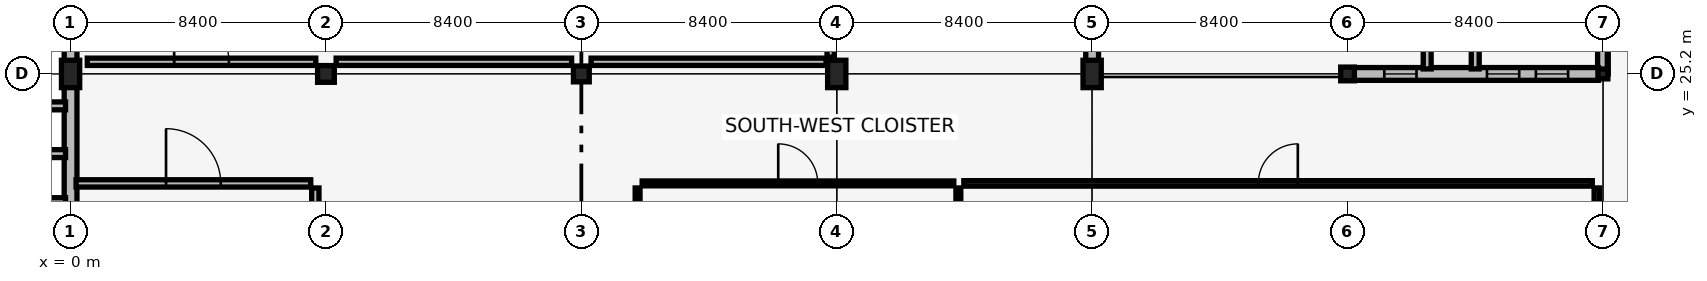
"""IFC4 building model, lengths in metres.
Left out: names, types, materials, properties, quantities, classifications, styles, units other than length and angle.
Written with IfcOpenShell. Run it as: python <this file> out.ifc"""

import sys

from ifc_helpers import new_model, si_unit, direction, frame, frame_2d, origin, origin_2d, place, context, subcontext, project, spatial, polyline, rectangle, hollow_circle, outline, extrude, element, fill, save


model = new_model("IFC4")
c1 = context("Model", 3, precision=1e-05, world=origin(), true_north=direction((0.0, 1.0)))
c2 = subcontext(c1, "Body", "Model", "MODEL_VIEW")
j1 = project(units=[si_unit("LENGTHUNIT", "METRE"), si_unit("PLANEANGLEUNIT", "RADIAN")], contexts=[c1])
p1 = place(None, origin())
s1 = spatial("IfcSite", under=j1, at=p1, CompositionType="ELEMENT")
p2 = place(p1, origin())
s2 = spatial("IfcBuilding", under=s1, at=p2, CompositionType="ELEMENT")
p3 = place(p2, origin())
s3 = spatial("IfcBuildingStorey", under=s2, at=p3, CompositionType="ELEMENT", Elevation=0.0)
p4 = place(p3, frame((0.0, 25.2, 0.0), z_axis=(0.0, 0.0, 1.0), x_axis=(1.0, 0.0, 0.0)))
e1 = element("IfcColumn", 1, at=p4, inside=s3, PredefinedType="COLUMN", context=c2, shape_type="SweptSolid", body=[
    extrude(rectangle(XDim=0.6, YDim=0.9, at=origin_2d()), origin(), (0.0, 0.0, 1.0), 5.14),
])
p5 = place(p3, frame((8.4, 25.2, 0.0), z_axis=(0.0, 0.0, 1.0), x_axis=(1.0, 0.0, 0.0)))
e2 = element("IfcColumn", 2, at=p5, inside=s3, PredefinedType="COLUMN", context=c2, shape_type="SweptSolid", body=[
    extrude(rectangle(XDim=0.55, YDim=0.55, at=origin_2d()), origin(), (0.0, 0.0, 1.0), 5.16),
])
p6 = place(p3, frame((16.8, 25.2, 0.0), z_axis=(0.0, 0.0, 1.0), x_axis=(1.0, 0.0, 0.0)))
e3 = element("IfcColumn", 3, at=p6, inside=s3, PredefinedType="COLUMN", context=c2, shape_type="SweptSolid", body=[
    extrude(rectangle(XDim=0.52, YDim=0.52, at=origin_2d()), origin(), (0.0, 0.0, 1.0), 5.16),
])
for number, where, z_axis, x_axis in (
    (4, (25.2, 25.2, 0.0), (0.0, 0.0, 1.0), (1.0, 0.0, 0.0)),
    (5, (33.6, 25.2, 0.0), (0.0, 0.0, 1.0), (1.0, 0.0, 0.0)),
):
    element("IfcColumn", number, at=place(p3, frame(where, z_axis=z_axis, x_axis=x_axis)), inside=s3, PredefinedType="COLUMN", context=c2, shape_type="SweptSolid", body=[
        extrude(rectangle(XDim=0.6, YDim=0.9, at=origin_2d()), origin(), (0.0, 0.0, 1.0), 5.14),
    ])
p7 = place(p3, frame((42.0, 25.2, -0.32), z_axis=(0.0, 0.0, 1.0), x_axis=(1.0, 0.0, 0.0)))
e6 = element("IfcColumn", 6, at=p7, inside=s3, PredefinedType="COLUMN", context=c2, shape_type="SweptSolid", body=[
    extrude(rectangle(XDim=0.45, YDim=0.45, at=origin_2d()), origin(), (0.0, 0.0, 1.0), 5.46),
])
p8 = place(p3, frame((50.4, 25.2, 0.0), z_axis=(0.0, 0.0, 1.0), x_axis=(1.0, 0.0, 0.0)))
e7 = element("IfcColumn", 7, at=p8, inside=s3, PredefinedType="COLUMN", context=c2, shape_type="SweptSolid", body=[
    extrude(hollow_circle(Radius=0.162, WallThickness=0.016, at=origin_2d()), origin(), (0.0, 0.0, 1.0), 5.14),
])
p9 = place(p3, frame((50.4, 25.2, 5.145), z_axis=(0.0, 0.0, 1.0), x_axis=(0.0, 1.0, 0.0)))
e8 = element("IfcWall", 8, at=p9, inside=s3, PredefinedType="SOLIDWALL", context=c2, shape_type="SweptSolid", body=[
    extrude(outline(polyline([(0.0, 0.0), (8.4, 0.0), (8.4, 0.25), (4.2, 2.489), (0.0, 0.25), (0.0, 0.0)])), frame((0.0, 0.175, 0.0), z_axis=(0.0, -1.0, 0.0), x_axis=(1.0, 0.0, 0.0)), (0.0, 0.0, 1.0), 0.35),
])
p10 = place(p3, frame((0.0, 17.025, 0.0), z_axis=(0.0, 0.0, 1.0), x_axis=(0.0, 1.0, 0.0)))
e9 = element("IfcWall", 9, at=p10, inside=s3, PredefinedType="SOLIDWALL", context=c2, shape_type="SweptSolid", body=[
    extrude(rectangle(XDim=7.74, YDim=0.42, at=frame_2d((3.87, 0.0))), origin(), (0.0, 0.0, 1.0), 4.39),
])
for number, where, z_axis, x_axis in (
    (10, (-0.165, 21.0, -0.25), (0.0, 0.0, 1.0), (-1.0, 0.0, 0.0)),
    (11, (-0.165, 22.58, -0.25), (0.0, 0.0, 1.0), (-1.0, 0.0, 0.0)),
    (12, (-0.165, 24.15, -0.25), (0.0, 0.0, 1.0), (-1.0, 0.0, 0.0)),
):
    element("IfcWall", number, at=place(p3, frame(where, z_axis=z_axis, x_axis=x_axis)), inside=s3, PredefinedType="SOLIDWALL", context=c2, shape_type="SweptSolid", body=[
        extrude(rectangle(XDim=0.7, YDim=0.26, at=frame_2d((0.35, 0.0))), origin(), (0.0, 0.0, 1.0), 5.69),
    ])
p11 = place(p3, frame((0.0, 25.635, 0.0), z_axis=(0.0, 0.0, 1.0), x_axis=(0.0, 1.0, 0.0)))
e13 = element("IfcWall", 13, at=p11, inside=s3, PredefinedType="SOLIDWALL", context=c2, shape_type="SweptSolid", body=[
    extrude(rectangle(XDim=7.53, YDim=0.42, at=frame_2d((3.765, 0.0))), origin(), (0.0, 0.0, 1.0), 5.04),
])
p12 = place(p3, frame((33.6, 25.635, 0.0), z_axis=(0.0, 0.0, 1.0), x_axis=(0.0, 1.0, 0.0)))
e14 = element("IfcWall", 14, at=p12, inside=s3, PredefinedType="SOLIDWALL", context=c2, shape_type="SweptSolid", body=[
    extrude(rectangle(XDim=7.53, YDim=0.42, at=frame_2d((3.765, 0.0))), origin(), (0.0, 0.0, 1.0), 4.35),
])
p13 = place(p3, frame((42.21, 25.2, 0.0), z_axis=(0.0, 0.0, 1.0), x_axis=(1.0, 0.0, 0.0)))
e15 = element("IfcWall", 15, at=p13, inside=s3, PredefinedType="SOLIDWALL", context=c2, shape_type="SweptSolid", body=[
    extrude(rectangle(XDim=8.043, YDim=0.42, at=frame_2d((4.021, 0.0))), origin(), (0.0, 0.0, 1.0), 4.39),
])
p14 = place(p13, frame((0.998, 0.0, 0.75)))
e16 = element("IfcOpeningElement", 16, at=p14, cuts=e15, PredefinedType="OPENING", context=c2, shape_type="SweptSolid", body=[
    extrude(rectangle(XDim=1.06, YDim=2.7, at=frame_2d((0.53, 1.35))), frame((0.0, 0.22, 0.0), z_axis=(0.0, -1.0, 0.0), x_axis=(1.0, 0.0, 0.0)), (0.0, 0.0, 1.0), 0.44),
])
p15 = place(p13, frame((4.376, 0.0, 0.75)))
e17 = element("IfcOpeningElement", 17, at=p15, cuts=e15, PredefinedType="OPENING", context=c2, shape_type="SweptSolid", body=[
    extrude(rectangle(XDim=1.06, YDim=2.7, at=frame_2d((0.53, 1.35))), frame((0.0, 0.22, 0.0), z_axis=(0.0, -1.0, 0.0), x_axis=(1.0, 0.0, 0.0)), (0.0, 0.0, 1.0), 0.44),
])
p16 = place(p13, frame((5.985, 0.0, 0.75)))
e18 = element("IfcOpeningElement", 18, at=p16, cuts=e15, PredefinedType="OPENING", context=c2, shape_type="SweptSolid", body=[
    extrude(rectangle(XDim=1.06, YDim=2.7, at=frame_2d((0.53, 1.35))), frame((0.0, 0.22, 0.0), z_axis=(0.0, -1.0, 0.0), x_axis=(1.0, 0.0, 0.0)), (0.0, 0.0, 1.0), 0.44),
])
for number, where, z_axis, x_axis in (
    (19, (44.62, 25.365, -0.32), (0.0, 0.0, 1.0), (0.0, 1.0, 0.0)),
    (20, (46.2, 25.365, -0.32), (0.0, 0.0, 1.0), (0.0, 1.0, 0.0)),
):
    element("IfcWall", number, at=place(p3, frame(where, z_axis=z_axis, x_axis=x_axis)), inside=s3, PredefinedType="SOLIDWALL", context=c2, shape_type="SweptSolid", body=[
        extrude(rectangle(XDim=0.7, YDim=0.26, at=frame_2d((0.35, 0.0))), origin(), (0.0, 0.0, 1.0), 5.76),
    ])
p17 = place(p3, frame((0.55, 25.6, 0.0), z_axis=(0.0, 0.0, 1.0), x_axis=(1.0, 0.0, 0.0)))
e21 = element("IfcWall", 21, at=p17, inside=s3, PredefinedType="PARTITIONING", context=c2, shape_type="SweptSolid", body=[
    extrude(rectangle(XDim=7.515, YDim=0.24, at=frame_2d((3.757, 0.0))), origin(), (0.0, 0.0, 1.0), 5.14),
])
p18 = place(p17, frame((2.857, 0.0, 0.0)))
e22 = element("IfcOpeningElement", 22, at=p18, cuts=e21, PredefinedType="OPENING", context=c2, shape_type="SweptSolid", body=[
    extrude(rectangle(XDim=1.8, YDim=2.4, at=frame_2d((0.9, 1.2))), frame((0.0, 0.13, 0.0), z_axis=(0.0, -1.0, 0.0), x_axis=(1.0, 0.0, 0.0)), (0.0, 0.0, 1.0), 0.26),
])
p19 = place(p3, frame((8.735, 25.6, 0.0), z_axis=(0.0, 0.0, 1.0), x_axis=(1.0, 0.0, 0.0)))
e23 = element("IfcWall", 23, at=p19, inside=s3, PredefinedType="PARTITIONING", context=c2, shape_type="SweptSolid", body=[
    extrude(rectangle(XDim=7.745, YDim=0.24, at=frame_2d((3.873, 0.0))), origin(), (0.0, 0.0, 1.0), 5.14),
])
p20 = place(p3, frame((17.12, 25.6, 0.0), z_axis=(0.0, 0.0, 1.0), x_axis=(1.0, 0.0, 0.0)))
e24 = element("IfcWall", 24, at=p20, inside=s3, PredefinedType="PARTITIONING", context=c2, shape_type="SweptSolid", body=[
    extrude(rectangle(XDim=7.73, YDim=0.24, at=frame_2d((3.865, 0.0))), origin(), (0.0, 0.0, 1.0), 5.14),
])
p21 = place(p3, frame((25.0, 25.75, 0.0), z_axis=(0.0, 0.0, 1.0), x_axis=(0.0, 1.0, 0.0)))
e25 = element("IfcWall", 25, at=p21, inside=s3, PredefinedType="PARTITIONING", context=c2, shape_type="SweptSolid", body=[
    extrude(rectangle(XDim=7.34, YDim=0.24, at=frame_2d((3.67, 0.0))), origin(), (0.0, 0.0, 1.0), 4.35),
])
p22 = place(p3, frame((0.18, 21.6, 0.0), z_axis=(0.0, 0.0, 1.0), x_axis=(1.0, 0.0, 0.0)))
e26 = element("IfcWall", 26, at=p22, inside=s3, PredefinedType="PARTITIONING", context=c2, shape_type="SweptSolid", body=[
    extrude(rectangle(XDim=7.72, YDim=0.24, at=frame_2d((3.86, 0.0))), origin(), (0.0, 0.0, 1.0), 4.39),
])
p23 = place(p22, frame((2.96, 0.0, 0.0)))
e27 = element("IfcOpeningElement", 27, at=p23, cuts=e26, PredefinedType="OPENING", context=c2, shape_type="SweptSolid", body=[
    extrude(rectangle(XDim=1.8, YDim=2.4, at=frame_2d((0.9, 1.2))), frame((0.0, 0.13, 0.0), z_axis=(0.0, -1.0, 0.0), x_axis=(1.0, 0.0, 0.0)), (0.0, 0.0, 1.0), 0.26),
])
p24 = place(p3, frame((8.05, 17.07, 0.0), z_axis=(0.0, 0.0, 1.0), x_axis=(0.0, 1.0, 0.0)))
e28 = element("IfcWall", 28, at=p24, inside=s3, PredefinedType="PARTITIONING", context=c2, shape_type="SweptSolid", body=[
    extrude(rectangle(XDim=4.38, YDim=0.24, at=frame_2d((2.19, 0.0))), origin(), (0.0, 0.0, 1.0), 4.36),
])
p25 = place(p3, frame((18.8, 21.6, 0.0), z_axis=(0.0, 0.0, 1.0), x_axis=(1.0, 0.0, 0.0)))
e29 = element("IfcWall", 29, at=p25, inside=s3, PredefinedType="PARTITIONING", context=c2, shape_type="SweptSolid", body=[
    extrude(rectangle(XDim=10.25, YDim=0.16, at=frame_2d((5.125, 0.0))), origin(), (0.0, 0.0, 1.0), 4.74),
])
p26 = place(p25, frame((4.475, 0.0, 0.0)))
e30 = element("IfcOpeningElement", 30, at=p26, cuts=e29, PredefinedType="OPENING", context=c2, shape_type="SweptSolid", body=[
    extrude(rectangle(XDim=1.3, YDim=2.2, at=frame_2d((0.65, 1.1))), frame((0.0, 0.09, 0.0), z_axis=(0.0, -1.0, 0.0), x_axis=(1.0, 0.0, 0.0)), (0.0, 0.0, 1.0), 0.18),
])
for number, where, z_axis, x_axis in (
    (31, (18.65, 3.38, 0.0), (0.0, 0.0, 1.0), (0.0, 1.0, 0.0)),
    (32, (29.2, 3.38, 0.0), (0.0, 0.0, 1.0), (0.0, 1.0, 0.0)),
):
    element("IfcWall", number, at=place(p3, frame(where, z_axis=z_axis, x_axis=x_axis)), inside=s3, PredefinedType="PARTITIONING", context=c2, shape_type="SweptSolid", body=[
        extrude(rectangle(XDim=18.07, YDim=0.16, at=frame_2d((9.035, 0.0))), origin(), (0.0, 0.0, 1.0), 4.36),
    ])
p27 = place(p3, frame((29.38, 21.6, 0.0), z_axis=(0.0, 0.0, 1.0), x_axis=(1.0, 0.0, 0.0)))
e33 = element("IfcWall", 33, at=p27, inside=s3, PredefinedType="PARTITIONING", context=c2, shape_type="SweptSolid", body=[
    extrude(rectangle(XDim=20.67, YDim=0.18, at=frame_2d((10.335, 0.0))), origin(), (0.0, 0.0, 1.0), 4.49),
])
p28 = place(p27, frame((9.685, 0.0, 0.0)))
e34 = element("IfcOpeningElement", 34, at=p28, cuts=e33, PredefinedType="OPENING", context=c2, shape_type="SweptSolid", body=[
    extrude(rectangle(XDim=1.3, YDim=2.2, at=frame_2d((0.65, 1.1))), frame((0.0, 0.1, 0.0), z_axis=(0.0, -1.0, 0.0), x_axis=(1.0, 0.0, 0.0)), (0.0, 0.0, 1.0), 0.2),
])
p29 = place(p3, frame((50.2, 17.022, 0.0), z_axis=(0.0, 0.0, 1.0), x_axis=(0.0, 1.0, 0.0)))
e35 = element("IfcWall", 35, at=p29, inside=s3, PredefinedType="PARTITIONING", context=c2, shape_type="SweptSolid", body=[
    extrude(rectangle(XDim=4.428, YDim=0.18, at=frame_2d((2.214, 0.0))), origin(), (0.0, 0.0, 1.0), 4.36),
])
p30 = place(p14, origin())
e36 = element("IfcWindow", 36, at=p30, inside=s3, PartitioningType="DOUBLE_PANEL_VERTICAL", PredefinedType="WINDOW", context=c2, shape_type="SweptSolid", body=[
    extrude(rectangle(XDim=1.06, YDim=2.7, at=frame_2d((0.53, 1.35))), frame((0.0, 0.03, 0.0), z_axis=(0.0, -1.0, 0.0), x_axis=(1.0, 0.0, 0.0)), (0.0, 0.0, 1.0), 0.06),
])
fill(e16, e36)
p31 = place(p15, origin())
e37 = element("IfcWindow", 37, at=p31, inside=s3, PartitioningType="DOUBLE_PANEL_VERTICAL", PredefinedType="WINDOW", context=c2, shape_type="SweptSolid", body=[
    extrude(rectangle(XDim=1.06, YDim=2.7, at=frame_2d((0.53, 1.35))), frame((0.0, 0.03, 0.0), z_axis=(0.0, -1.0, 0.0), x_axis=(1.0, 0.0, 0.0)), (0.0, 0.0, 1.0), 0.06),
])
fill(e17, e37)
p32 = place(p16, origin())
e38 = element("IfcWindow", 38, at=p32, inside=s3, PartitioningType="DOUBLE_PANEL_VERTICAL", PredefinedType="WINDOW", context=c2, shape_type="SweptSolid", body=[
    extrude(rectangle(XDim=1.06, YDim=2.7, at=frame_2d((0.53, 1.35))), frame((0.0, 0.03, 0.0), z_axis=(0.0, -1.0, 0.0), x_axis=(1.0, 0.0, 0.0)), (0.0, 0.0, 1.0), 0.06),
])
fill(e18, e38)
p33 = place(p18, origin())
e39 = element("IfcDoor", 39, at=p33, inside=s3, OperationType="DOUBLE_DOOR_SINGLE_SWING", PredefinedType="DOOR", context=c2, shape_type="SweptSolid", body=[
    extrude(rectangle(XDim=1.8, YDim=2.4, at=frame_2d((0.9, 1.2))), frame((0.0, 0.025, 0.0), z_axis=(0.0, -1.0, 0.0), x_axis=(1.0, 0.0, 0.0)), (0.0, 0.0, 1.0), 0.05),
])
fill(e22, e39)
p34 = place(p23, origin())
e40 = element("IfcDoor", 40, at=p34, inside=s3, OperationType="DOUBLE_DOOR_SINGLE_SWING", PredefinedType="DOOR", context=c2, shape_type="SweptSolid", body=[
    extrude(rectangle(XDim=1.8, YDim=2.4, at=frame_2d((0.9, 1.2))), frame((0.0, 0.025, 0.0), z_axis=(0.0, -1.0, 0.0), x_axis=(1.0, 0.0, 0.0)), (0.0, 0.0, 1.0), 0.05),
])
fill(e27, e40)
p35 = place(p26, origin())
e41 = element("IfcDoor", 41, at=p35, inside=s3, OperationType="SINGLE_SWING_LEFT", PredefinedType="DOOR", context=c2, shape_type="SweptSolid", body=[
    extrude(rectangle(XDim=1.3, YDim=2.2, at=frame_2d((0.65, 1.1))), frame((0.0, 0.025, 0.0), z_axis=(0.0, -1.0, 0.0), x_axis=(1.0, 0.0, 0.0)), (0.0, 0.0, 1.0), 0.05),
])
fill(e30, e41)
p36 = place(p28, origin())
e42 = element("IfcDoor", 42, at=p36, inside=s3, OperationType="SINGLE_SWING_RIGHT", PredefinedType="DOOR", context=c2, shape_type="SweptSolid", body=[
    extrude(rectangle(XDim=1.3, YDim=2.2, at=frame_2d((0.65, 1.1))), frame((0.0, 0.025, 0.0), z_axis=(0.0, -1.0, 0.0), x_axis=(1.0, 0.0, 0.0)), (0.0, 0.0, 1.0), 0.05),
])
fill(e34, e42)
save(model, sys.argv[1])
